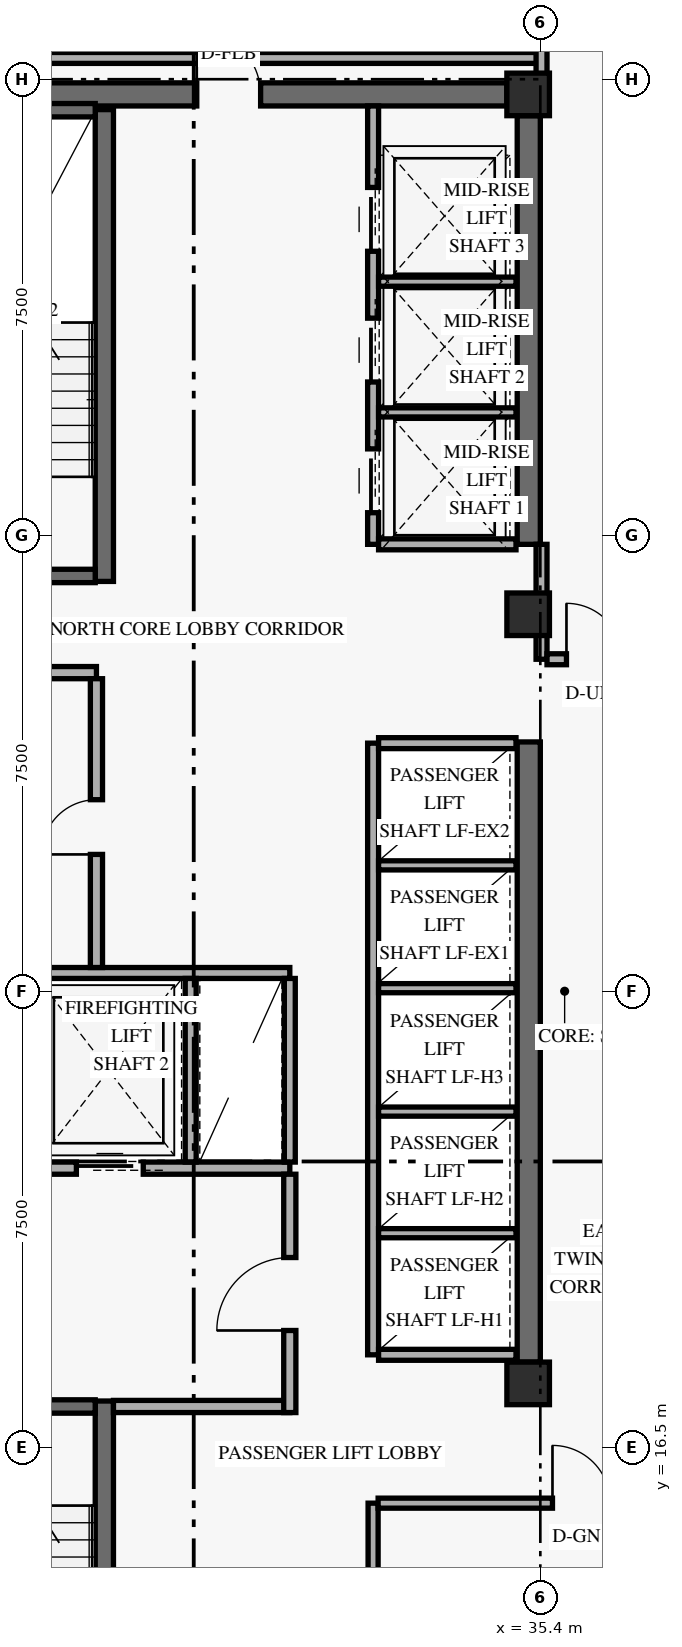
"""IFC4 building model, lengths in metres.
Left out: names, types, materials, properties, quantities, classifications, styles, units other than length and angle.
Written with IfcOpenShell. Run it as: python <this file> out.ifc"""

import sys

from ifc_helpers import new_model, si_unit, direction, frame, frame_2d, origin, origin_2d, place, context, subcontext, project, spatial, rectangle, extrude, element, fill, save


model = new_model("IFC4")
c1 = context("Model", 3, precision=1e-05, world=origin(), true_north=direction((0.0, 1.0)))
c2 = subcontext(c1, "Body", "Model", "MODEL_VIEW")
j1 = project(units=[si_unit("LENGTHUNIT", "METRE"), si_unit("PLANEANGLEUNIT", "RADIAN")], contexts=[c1])
p1 = place(None, origin())
s1 = spatial("IfcSite", under=j1, at=p1, CompositionType="ELEMENT")
p2 = place(p1, origin())
s2 = spatial("IfcBuilding", under=s1, at=p2, CompositionType="ELEMENT")
p3 = place(p2, frame((0.0, 0.0, 188.4)))
s3 = spatial("IfcBuildingStorey", under=s2, at=p3, CompositionType="ELEMENT", Elevation=188.4)
p4 = place(p3, frame((35.21, 17.9, 0.0), z_axis=(0.0, 0.0, 1.0), x_axis=(0.0, 1.0, 0.0)))
e1 = element("IfcWall", 1, at=p4, inside=s3, PredefinedType="SHEAR", context=c2, shape_type="SweptSolid", body=[
    extrude(rectangle(XDim=10.2, YDim=0.38, at=frame_2d((5.1, 0.0))), origin(), (0.0, 0.0, 1.0), 2.738),
])
p5 = place(p3, frame((35.21, 31.35, 0.0), z_axis=(0.0, 0.0, 1.0), x_axis=(0.0, 1.0, 0.0)))
e2 = element("IfcWall", 2, at=p5, inside=s3, PredefinedType="SHEAR", context=c2, shape_type="SweptSolid", body=[
    extrude(rectangle(XDim=7.05, YDim=0.38, at=frame_2d((3.525, 0.0))), origin(), (0.0, 0.0, 1.0), 2.738),
])
p6 = place(p3, frame((24.55, 38.75, 0.0), z_axis=(0.0, 0.0, 1.0), x_axis=(1.0, 0.0, 0.0)))
e3 = element("IfcWall", 3, at=p6, inside=s3, PredefinedType="SHEAR", context=c2, shape_type="SweptSolid", body=[
    extrude(rectangle(XDim=10.3, YDim=0.38, at=frame_2d((5.15, 0.0))), origin(), (0.0, 0.0, 1.0), 3.35),
])
p7 = place(p6, frame((5.2, 0.0, 0.0)))
e4 = element("IfcOpeningElement", 4, at=p7, cuts=e3, PredefinedType="OPENING", context=c2, shape_type="SweptSolid", body=[
    extrude(rectangle(XDim=1.05, YDim=2.15, at=frame_2d((0.525, 1.075))), frame((0.0, 0.2, 0.0), z_axis=(0.0, -1.0, 0.0), x_axis=(1.0, 0.0, 0.0)), (0.0, 0.0, 1.0), 0.4),
])
p8 = place(p3, frame((28.23, 9.5, 0.0), z_axis=(0.0, 0.0, 1.0), x_axis=(0.0, 1.0, 0.0)))
e5 = element("IfcWall", 5, at=p8, inside=s3, PredefinedType="SHEAR", context=c2, shape_type="SweptSolid", body=[
    extrude(rectangle(XDim=7.76, YDim=0.3, at=frame_2d((3.88, 0.0))), origin(), (0.0, 0.0, 1.0), 3.35),
])
p9 = place(p3, frame((24.92, 17.17, 0.0), z_axis=(0.0, 0.0, 1.0), x_axis=(1.0, 0.0, 0.0)))
e6 = element("IfcWall", 6, at=p9, inside=s3, PredefinedType="SHEAR", context=c2, shape_type="SweptSolid", body=[
    extrude(rectangle(XDim=3.16, YDim=0.22, at=frame_2d((1.58, 0.0))), origin(), (0.0, 0.0, 1.0), 3.35),
])
p10 = place(p9, frame((0.78, 0.0, 0.0)))
e7 = element("IfcOpeningElement", 7, at=p10, cuts=e6, PredefinedType="OPENING", context=c2, shape_type="SweptSolid", body=[
    extrude(rectangle(XDim=1.05, YDim=2.15, at=frame_2d((0.525, 1.075))), frame((0.0, 0.12, 0.0), z_axis=(0.0, -1.0, 0.0), x_axis=(1.0, 0.0, 0.0)), (0.0, 0.0, 1.0), 0.24),
])
p11 = place(p3, frame((28.23, 30.74, 0.0), z_axis=(0.0, 0.0, 1.0), x_axis=(0.0, 1.0, 0.0)))
e8 = element("IfcWall", 8, at=p11, inside=s3, PredefinedType="SHEAR", context=c2, shape_type="SweptSolid", body=[
    extrude(rectangle(XDim=7.76, YDim=0.3, at=frame_2d((3.88, 0.0))), origin(), (0.0, 0.0, 1.0), 3.35),
])
p12 = place(p3, frame((24.92, 30.83, 0.0), z_axis=(0.0, 0.0, 1.0), x_axis=(1.0, 0.0, 0.0)))
e9 = element("IfcWall", 9, at=p12, inside=s3, PredefinedType="SHEAR", context=c2, shape_type="SweptSolid", body=[
    extrude(rectangle(XDim=3.16, YDim=0.22, at=frame_2d((1.58, 0.0))), origin(), (0.0, 0.0, 1.0), 3.35),
])
p13 = place(p12, frame((0.78, 0.0, 0.0)))
e10 = element("IfcOpeningElement", 10, at=p13, cuts=e9, PredefinedType="OPENING", context=c2, shape_type="SweptSolid", body=[
    extrude(rectangle(XDim=1.05, YDim=2.15, at=frame_2d((0.525, 1.075))), frame((0.0, 0.12, 0.0), z_axis=(0.0, -1.0, 0.0), x_axis=(1.0, 0.0, 0.0)), (0.0, 0.0, 1.0), 0.24),
])
p14 = place(p3, frame((24.92, 38.49, 0.0), z_axis=(0.0, 0.0, 1.0), x_axis=(1.0, 0.0, 0.0)))
e11 = element("IfcWall", 11, at=p14, inside=s3, PredefinedType="SHEAR", context=c2, shape_type="SweptSolid", body=[
    extrude(rectangle(XDim=3.16, YDim=0.22, at=frame_2d((1.58, 0.0))), origin(), (0.0, 0.0, 1.0), 3.35),
])
for number, where, z_axis, x_axis in (
    (12, (35.2, 17.55, 0.0), (0.0, 0.0, 1.0), (1.0, 0.0, 0.0)),
    (13, (35.2, 30.2, 0.0), (0.0, 0.0, 1.0), (1.0, 0.0, 0.0)),
    (14, (35.2, 38.75, 0.0), (0.0, 0.0, 1.0), (1.0, 0.0, 0.0)),
):
    element("IfcColumn", number, at=place(p3, frame(where, z_axis=z_axis, x_axis=x_axis)), inside=s3, PredefinedType="COLUMN", context=c2, shape_type="SweptSolid", body=[
        extrude(rectangle(XDim=0.7, YDim=0.7, at=origin_2d()), origin(), (0.0, 0.0, 1.0), 3.6),
    ])
p15 = place(p3, frame((24.45, 21.09, 0.0), z_axis=(0.0, 0.0, 1.0), x_axis=(1.0, 0.0, 0.0)))
e15 = element("IfcWall", 15, at=p15, inside=s3, PredefinedType="STANDARD", context=c2, shape_type="SweptSolid", body=[
    extrude(rectangle(XDim=6.83, YDim=0.2, at=frame_2d((3.415, 0.0))), origin(), (0.0, 0.0, 1.0), 3.35),
])
p16 = place(p15, frame((0.72, 0.0, 0.0)))
e16 = element("IfcOpeningElement", 16, at=p16, cuts=e15, PredefinedType="OPENING", context=c2, shape_type="SweptSolid", body=[
    extrude(rectangle(XDim=1.1, YDim=2.2, at=frame_2d((0.55, 1.1))), frame((0.0, 0.11, 0.0), z_axis=(0.0, -1.0, 0.0), x_axis=(1.0, 0.0, 0.0)), (0.0, 0.0, 1.0), 0.22),
])
p17 = place(p15, frame((3.32, 0.0, 0.0)))
e17 = element("IfcOpeningElement", 17, at=p17, cuts=e15, PredefinedType="OPENING", context=c2, shape_type="SweptSolid", body=[
    extrude(rectangle(XDim=1.1, YDim=2.2, at=frame_2d((0.55, 1.1))), frame((0.0, 0.11, 0.0), z_axis=(0.0, -1.0, 0.0), x_axis=(1.0, 0.0, 0.0)), (0.0, 0.0, 1.0), 0.22),
])
p18 = place(p3, frame((28.38, 17.17, 0.0), z_axis=(0.0, 0.0, 1.0), x_axis=(1.0, 0.0, 0.0)))
e18 = element("IfcWall", 18, at=p18, inside=s3, PredefinedType="STANDARD", context=c2, shape_type="SweptSolid", body=[
    extrude(rectangle(XDim=2.9, YDim=0.2, at=frame_2d((1.45, 0.0))), origin(), (0.0, 0.0, 1.0), 3.35),
])
p19 = place(p3, frame((31.28, 17.07, 0.0), z_axis=(0.0, 0.0, 1.0), x_axis=(0.0, 1.0, 0.0)))
e19 = element("IfcWall", 19, at=p19, inside=s3, PredefinedType="STANDARD", context=c2, shape_type="SweptSolid", body=[
    extrude(rectangle(XDim=3.92, YDim=0.2, at=frame_2d((1.96, 0.0))), origin(), (0.0, 0.0, 1.0), 2.72),
])
p20 = place(p19, frame((1.35, 0.0, 0.0)))
e20 = element("IfcOpeningElement", 20, at=p20, cuts=e19, PredefinedType="OPENING", context=c2, shape_type="SweptSolid", body=[
    extrude(rectangle(XDim=1.2, YDim=2.15, at=frame_2d((0.6, 1.075))), frame((0.0, 0.11, 0.0), z_axis=(0.0, -1.0, 0.0), x_axis=(1.0, 0.0, 0.0)), (0.0, 0.0, 1.0), 0.22),
])
p21 = place(p3, frame((24.45, 24.3, 0.0), z_axis=(0.0, 0.0, 1.0), x_axis=(1.0, 0.0, 0.0)))
e21 = element("IfcWall", 21, at=p21, inside=s3, PredefinedType="STANDARD", context=c2, shape_type="SweptSolid", body=[
    extrude(rectangle(XDim=6.83, YDim=0.18, at=frame_2d((3.415, 0.0))), origin(), (0.0, 0.0, 1.0), 3.35),
])
for number, where, z_axis, x_axis in (
    (22, (29.65, 21.19, 0.0), (0.0, 0.0, 1.0), (0.0, 1.0, 0.0)),
    (23, (31.28, 21.19, 0.0), (0.0, 0.0, 1.0), (0.0, 1.0, 0.0)),
):
    element("IfcWall", number, at=place(p3, frame(where, z_axis=z_axis, x_axis=x_axis)), inside=s3, PredefinedType="STANDARD", context=c2, shape_type="SweptSolid", body=[
        extrude(rectangle(XDim=3.02, YDim=0.18, at=frame_2d((1.51, 0.0))), origin(), (0.0, 0.0, 1.0), 3.35),
    ])
p22 = place(p3, frame((24.45, 29.24, 0.0), z_axis=(0.0, 0.0, 1.0), x_axis=(1.0, 0.0, 0.0)))
e24 = element("IfcWall", 24, at=p22, inside=s3, PredefinedType="STANDARD", context=c2, shape_type="SweptSolid", body=[
    extrude(rectangle(XDim=3.65, YDim=0.2, at=frame_2d((1.825, 0.0))), origin(), (0.0, 0.0, 1.0), 3.35),
])
p23 = place(p3, frame((28.1, 24.39, 0.0), z_axis=(0.0, 0.0, 1.0), x_axis=(0.0, 1.0, 0.0)))
e25 = element("IfcWall", 25, at=p23, inside=s3, PredefinedType="STANDARD", context=c2, shape_type="SweptSolid", body=[
    extrude(rectangle(XDim=4.75, YDim=0.2, at=frame_2d((2.375, 0.0))), origin(), (0.0, 0.0, 1.0), 3.35),
])
p24 = place(p23, frame((1.86, 0.0, 0.0)))
e26 = element("IfcOpeningElement", 26, at=p24, cuts=e25, PredefinedType="OPENING", context=c2, shape_type="SweptSolid", body=[
    extrude(rectangle(XDim=0.9, YDim=2.1, at=frame_2d((0.45, 1.05))), frame((0.0, 0.11, 0.0), z_axis=(0.0, -1.0, 0.0), x_axis=(1.0, 0.0, 0.0)), (0.0, 0.0, 1.0), 0.22),
])
p25 = place(p3, frame((32.65, 18.02, 0.0), z_axis=(0.0, 0.0, 1.0), x_axis=(0.0, 1.0, 0.0)))
e27 = element("IfcWall", 27, at=p25, inside=s3, PredefinedType="STANDARD", context=c2, shape_type="SweptSolid", body=[
    extrude(rectangle(XDim=10.06, YDim=0.18, at=frame_2d((5.03, 0.0))), origin(), (0.0, 0.0, 1.0), 3.35),
])
for number, where, z_axis, x_axis in (
    (28, (32.74, 18.02, 0.0), (0.0, 0.0, 1.0), (1.0, 0.0, 0.0)),
    (29, (32.74, 28.08, 0.0), (0.0, 0.0, 1.0), (1.0, 0.0, 0.0)),
):
    element("IfcWall", number, at=place(p3, frame(where, z_axis=z_axis, x_axis=x_axis)), inside=s3, PredefinedType="STANDARD", context=c2, shape_type="SweptSolid", body=[
        extrude(rectangle(XDim=2.26, YDim=0.18, at=frame_2d((1.13, 0.0))), origin(), (0.0, 0.0, 1.0), 3.35),
    ])
for number, where, z_axis, x_axis in (
    (30, (32.74, 20.02, 0.0), (0.0, 0.0, 1.0), (1.0, 0.0, 0.0)),
    (31, (32.74, 22.02, 0.0), (0.0, 0.0, 1.0), (1.0, 0.0, 0.0)),
    (32, (32.74, 24.05, 0.0), (0.0, 0.0, 1.0), (1.0, 0.0, 0.0)),
    (33, (32.74, 26.07, 0.0), (0.0, 0.0, 1.0), (1.0, 0.0, 0.0)),
):
    element("IfcWall", number, at=place(p3, frame(where, z_axis=z_axis, x_axis=x_axis)), inside=s3, PredefinedType="STANDARD", context=c2, shape_type="SweptSolid", body=[
        extrude(rectangle(XDim=2.26, YDim=0.15, at=frame_2d((1.13, 0.0))), origin(), (0.0, 0.0, 1.0), 3.35),
    ])
p26 = place(p3, frame((32.65, 31.35, 0.0), z_axis=(0.0, 0.0, 1.0), x_axis=(0.0, 1.0, 0.0)))
e34 = element("IfcWall", 34, at=p26, inside=s3, PredefinedType="STANDARD", context=c2, shape_type="SweptSolid", body=[
    extrude(rectangle(XDim=7.21, YDim=0.18, at=frame_2d((3.605, 0.0))), origin(), (0.0, 0.0, 1.0), 3.35),
])
p27 = place(p26, frame((0.52, 0.0, 0.0)))
e35 = element("IfcOpeningElement", 35, at=p27, cuts=e34, PredefinedType="OPENING", context=c2, shape_type="SweptSolid", body=[
    extrude(rectangle(XDim=1.05, YDim=2.2, at=frame_2d((0.525, 1.1))), frame((0.0, 0.1, 0.0), z_axis=(0.0, -1.0, 0.0), x_axis=(1.0, 0.0, 0.0)), (0.0, 0.0, 1.0), 0.2),
])
p28 = place(p26, frame((2.67, 0.0, 0.0)))
e36 = element("IfcOpeningElement", 36, at=p28, cuts=e34, PredefinedType="OPENING", context=c2, shape_type="SweptSolid", body=[
    extrude(rectangle(XDim=1.05, YDim=2.2, at=frame_2d((0.525, 1.1))), frame((0.0, 0.1, 0.0), z_axis=(0.0, -1.0, 0.0), x_axis=(1.0, 0.0, 0.0)), (0.0, 0.0, 1.0), 0.2),
])
p29 = place(p26, frame((4.82, 0.0, 0.0)))
e37 = element("IfcOpeningElement", 37, at=p29, cuts=e34, PredefinedType="OPENING", context=c2, shape_type="SweptSolid", body=[
    extrude(rectangle(XDim=1.05, YDim=2.2, at=frame_2d((0.525, 1.1))), frame((0.0, 0.1, 0.0), z_axis=(0.0, -1.0, 0.0), x_axis=(1.0, 0.0, 0.0)), (0.0, 0.0, 1.0), 0.2),
])
p30 = place(p3, frame((32.74, 31.35, 0.0), z_axis=(0.0, 0.0, 1.0), x_axis=(1.0, 0.0, 0.0)))
e38 = element("IfcWall", 38, at=p30, inside=s3, PredefinedType="STANDARD", context=c2, shape_type="SweptSolid", body=[
    extrude(rectangle(XDim=2.26, YDim=0.18, at=frame_2d((1.13, 0.0))), origin(), (0.0, 0.0, 1.0), 3.35),
])
for number, where, z_axis, x_axis in (
    (39, (32.74, 33.52, 0.0), (0.0, 0.0, 1.0), (1.0, 0.0, 0.0)),
    (40, (32.74, 35.67, 0.0), (0.0, 0.0, 1.0), (1.0, 0.0, 0.0)),
):
    element("IfcWall", number, at=place(p3, frame(where, z_axis=z_axis, x_axis=x_axis)), inside=s3, PredefinedType="STANDARD", context=c2, shape_type="SweptSolid", body=[
        extrude(rectangle(XDim=2.26, YDim=0.15, at=frame_2d((1.13, 0.0))), origin(), (0.0, 0.0, 1.0), 3.35),
    ])
p31 = place(p3, frame((32.65, 9.5, 0.0), z_axis=(0.0, 0.0, 1.0), x_axis=(0.0, 1.0, 0.0)))
e41 = element("IfcWall", 41, at=p31, inside=s3, PredefinedType="PARTITIONING", context=c2, shape_type="SweptSolid", body=[
    extrude(rectangle(XDim=6.08, YDim=0.165, at=frame_2d((3.04, 0.0))), origin(), (0.0, 0.0, 1.0), 3.35),
])
p32 = place(p3, frame((32.732, 15.58, 0.0), z_axis=(0.0, 0.0, 1.0), x_axis=(1.0, 0.0, 0.0)))
e42 = element("IfcWall", 42, at=p32, inside=s3, PredefinedType="PARTITIONING", context=c2, shape_type="SweptSolid", body=[
    extrude(rectangle(XDim=5.218, YDim=0.165, at=frame_2d((2.609, 0.0))), origin(), (0.0, 0.0, 1.0), 2.72),
])
p33 = place(p32, frame((2.867, 0.0, 0.0)))
e43 = element("IfcOpeningElement", 43, at=p33, cuts=e42, PredefinedType="OPENING", context=c2, shape_type="SweptSolid", body=[
    extrude(rectangle(XDim=0.95, YDim=2.15, at=frame_2d((0.475, 1.075))), frame((0.0, 0.093, 0.0), z_axis=(0.0, -1.0, 0.0), x_axis=(1.0, 0.0, 0.0)), (0.0, 0.0, 1.0), 0.185),
])
p34 = place(p3, frame((35.42, 29.46, 0.0), z_axis=(0.0, 0.0, 1.0), x_axis=(0.0, 1.0, 0.0)))
e44 = element("IfcWall", 44, at=p34, inside=s3, PredefinedType="STANDARD", context=c2, shape_type="SweptSolid", body=[
    extrude(rectangle(XDim=1.89, YDim=0.18, at=frame_2d((0.945, 0.0))), origin(), (0.0, 0.0, 1.0), 2.72),
])
p35 = place(p3, frame((35.51, 29.46, 0.0), z_axis=(0.0, 0.0, 1.0), x_axis=(1.0, 0.0, 0.0)))
e45 = element("IfcWall", 45, at=p35, inside=s3, PredefinedType="STANDARD", context=c2, shape_type="SweptSolid", body=[
    extrude(rectangle(XDim=11.733, YDim=0.18, at=frame_2d((5.866, 0.0))), origin(), (0.0, 0.0, 1.0), 2.72),
])
p36 = place(p35, frame((0.32, 0.0, 0.0)))
e46 = element("IfcOpeningElement", 46, at=p36, cuts=e45, PredefinedType="OPENING", context=c2, shape_type="SweptSolid", body=[
    extrude(rectangle(XDim=0.92, YDim=2.15, at=frame_2d((0.46, 1.075))), frame((0.0, 0.1, 0.0), z_axis=(0.0, -1.0, 0.0), x_axis=(1.0, 0.0, 0.0)), (0.0, 0.0, 1.0), 0.2),
])
p37 = place(p3, frame((23.85, 39.35, 0.0), z_axis=(0.0, 0.0, 1.0), x_axis=(1.0, 0.0, 0.0)))
e47 = element("IfcWall", 47, at=p37, inside=s3, PredefinedType="STANDARD", context=c2, shape_type="SweptSolid", body=[
    extrude(rectangle(XDim=11.57, YDim=0.18, at=frame_2d((5.785, 0.0))), origin(), (0.0, 0.0, 1.0), 2.72),
])
p38 = place(p3, frame((35.42, 38.75, 0.0), z_axis=(0.0, 0.0, 1.0), x_axis=(0.0, 1.0, 0.0)))
e48 = element("IfcWall", 48, at=p38, inside=s3, PredefinedType="PARTITIONING", context=c2, shape_type="SweptSolid", body=[
    extrude(rectangle(XDim=4.97, YDim=0.18, at=frame_2d((2.485, 0.0))), origin(), (0.0, 0.0, 1.0), 2.72),
])
p39 = place(p17, origin())
e49 = element("IfcDoor", 49, at=p39, inside=s3, OperationType="SLIDING_TO_LEFT", PredefinedType="DOOR", context=c2, shape_type="SweptSolid", body=[
    extrude(rectangle(XDim=1.1, YDim=2.2, at=frame_2d((0.55, 1.1))), frame((0.0, 0.025, 0.0), z_axis=(0.0, -1.0, 0.0), x_axis=(1.0, 0.0, 0.0)), (0.0, 0.0, 1.0), 0.05),
])
fill(e17, e49)
p40 = place(p20, origin())
e50 = element("IfcDoor", 50, at=p40, inside=s3, OperationType="SINGLE_SWING_LEFT", PredefinedType="DOOR", context=c2, shape_type="SweptSolid", body=[
    extrude(rectangle(XDim=1.2, YDim=2.15, at=frame_2d((0.6, 1.075))), frame((0.0, 0.025, 0.0), z_axis=(0.0, -1.0, 0.0), x_axis=(1.0, 0.0, 0.0)), (0.0, 0.0, 1.0), 0.05),
])
fill(e20, e50)
p41 = place(p24, origin())
e51 = element("IfcDoor", 51, at=p41, inside=s3, OperationType="SINGLE_SWING_LEFT", PredefinedType="DOOR", context=c2, shape_type="SweptSolid", body=[
    extrude(rectangle(XDim=0.9, YDim=2.1, at=frame_2d((0.45, 1.05))), frame((0.0, 0.025, 0.0), z_axis=(0.0, -1.0, 0.0), x_axis=(1.0, 0.0, 0.0)), (0.0, 0.0, 1.0), 0.05),
])
fill(e26, e51)
p42 = place(p27, origin())
e52 = element("IfcDoor", 52, at=p42, inside=s3, OperationType="SLIDING_TO_LEFT", PredefinedType="DOOR", context=c2, shape_type="SweptSolid", body=[
    extrude(rectangle(XDim=1.05, YDim=2.2, at=frame_2d((0.525, 1.1))), frame((0.0, 0.025, 0.0), z_axis=(0.0, -1.0, 0.0), x_axis=(1.0, 0.0, 0.0)), (0.0, 0.0, 1.0), 0.05),
])
fill(e35, e52)
p43 = place(p28, origin())
e53 = element("IfcDoor", 53, at=p43, inside=s3, OperationType="SLIDING_TO_LEFT", PredefinedType="DOOR", context=c2, shape_type="SweptSolid", body=[
    extrude(rectangle(XDim=1.05, YDim=2.2, at=frame_2d((0.525, 1.1))), frame((0.0, 0.025, 0.0), z_axis=(0.0, -1.0, 0.0), x_axis=(1.0, 0.0, 0.0)), (0.0, 0.0, 1.0), 0.05),
])
fill(e36, e53)
p44 = place(p29, origin())
e54 = element("IfcDoor", 54, at=p44, inside=s3, OperationType="SLIDING_TO_LEFT", PredefinedType="DOOR", context=c2, shape_type="SweptSolid", body=[
    extrude(rectangle(XDim=1.05, YDim=2.2, at=frame_2d((0.525, 1.1))), frame((0.0, 0.025, 0.0), z_axis=(0.0, -1.0, 0.0), x_axis=(1.0, 0.0, 0.0)), (0.0, 0.0, 1.0), 0.05),
])
fill(e37, e54)
p45 = place(p33, origin())
e55 = element("IfcDoor", 55, at=p45, inside=s3, OperationType="SINGLE_SWING_LEFT", PredefinedType="DOOR", context=c2, shape_type="SweptSolid", body=[
    extrude(rectangle(XDim=0.95, YDim=2.15, at=frame_2d((0.475, 1.075))), frame((0.0, 0.025, 0.0), z_axis=(0.0, -1.0, 0.0), x_axis=(1.0, 0.0, 0.0)), (0.0, 0.0, 1.0), 0.05),
])
fill(e43, e55)
p46 = place(p7, frame((1.05, 0.0, 0.0), z_axis=(0.0, 0.0, 1.0), x_axis=(-1.0, 0.0, 0.0)))
e56 = element("IfcDoor", 56, at=p46, inside=s3, OperationType="SINGLE_SWING_RIGHT", PredefinedType="DOOR", context=c2, shape_type="SweptSolid", body=[
    extrude(rectangle(XDim=1.05, YDim=2.15, at=frame_2d((0.525, 1.075))), frame((0.0, 0.025, 0.0), z_axis=(0.0, -1.0, 0.0), x_axis=(1.0, 0.0, 0.0)), (0.0, 0.0, 1.0), 0.05),
])
fill(e4, e56)
p47 = place(p36, origin())
e57 = element("IfcDoor", 57, at=p47, inside=s3, OperationType="SINGLE_SWING_LEFT", PredefinedType="DOOR", context=c2, shape_type="SweptSolid", body=[
    extrude(rectangle(XDim=0.92, YDim=2.15, at=frame_2d((0.46, 1.075))), frame((0.0, 0.025, 0.0), z_axis=(0.0, -1.0, 0.0), x_axis=(1.0, 0.0, 0.0)), (0.0, 0.0, 1.0), 0.05),
])
fill(e46, e57)
save(model, sys.argv[1])
